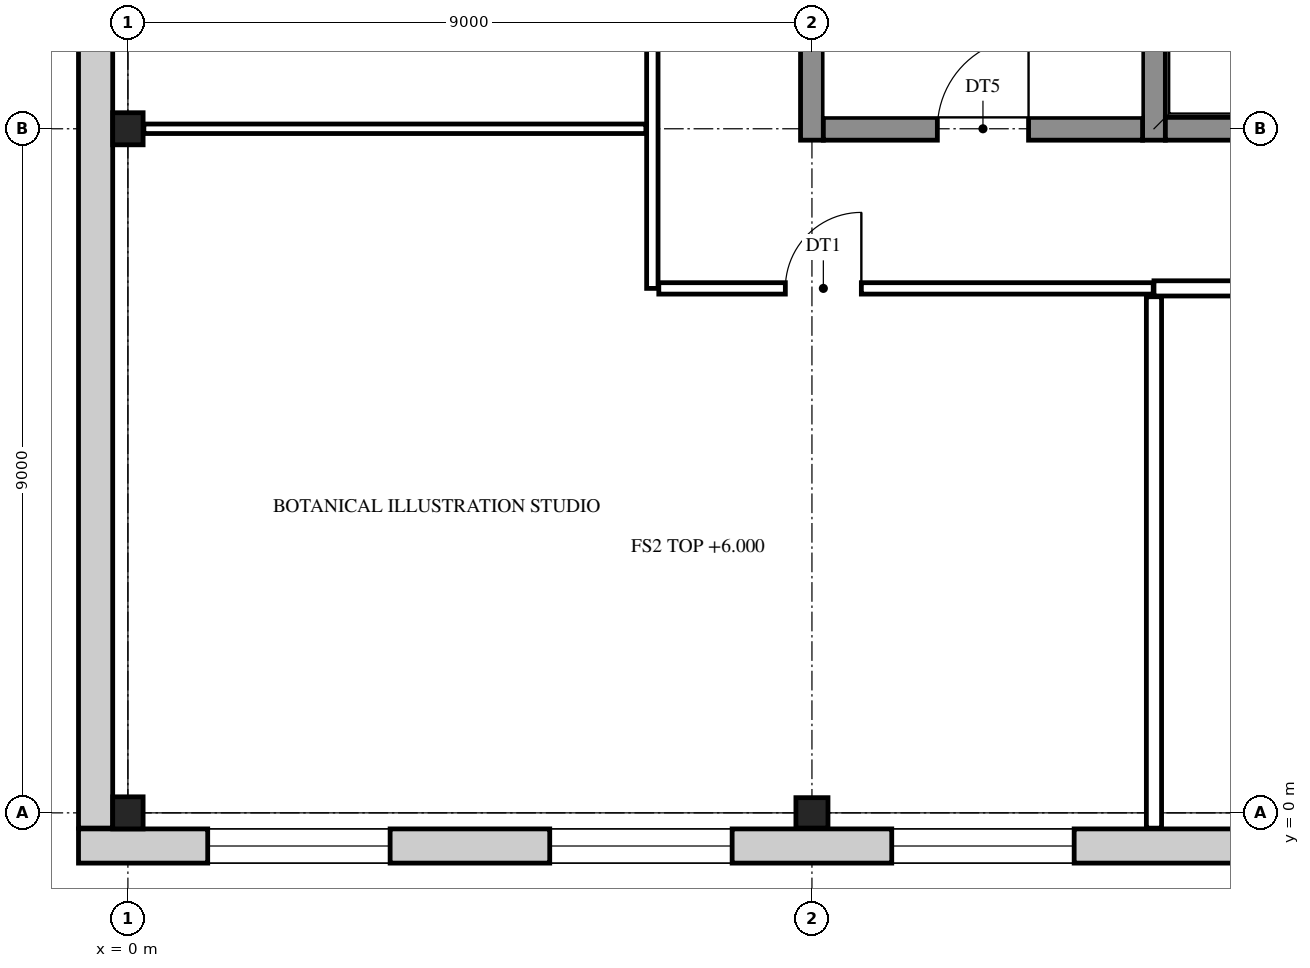
"""IFC4 building model, lengths in metres.
Left out: names, types, materials, properties, quantities, classifications, styles, units other than length and angle.
Written with IfcOpenShell. Run it as: python <this file> out.ifc"""

import sys

from ifc_helpers import new_model, si_unit, direction, frame, frame_2d, origin, origin_2d, place, context, subcontext, project, spatial, rectangle, i_section, extrude, element, fill, save


model = new_model("IFC4")
c1 = context("Model", 3, precision=1e-05, world=origin(), true_north=direction((0.0, 1.0)))
c2 = subcontext(c1, "Body", "Model", "MODEL_VIEW")
j1 = project(units=[si_unit("LENGTHUNIT", "METRE"), si_unit("PLANEANGLEUNIT", "RADIAN")], contexts=[c1])
p1 = place(None, origin())
s1 = spatial("IfcSite", under=j1, at=p1, CompositionType="ELEMENT")
p2 = place(p1, origin())
s2 = spatial("IfcBuilding", under=s1, at=p2, CompositionType="ELEMENT")
p3 = place(p2, frame((0.0, 0.0, 6.0)))
s3 = spatial("IfcBuildingStorey", under=s2, at=p3, CompositionType="ELEMENT", Elevation=6.0)
for number, where, z_axis, x_axis in (
    (1, (0.0, 0.0, 0.0), (0.0, 0.0, 1.0), (1.0, 0.0, 0.0)),
    (2, (0.0, 9.0, 0.0), (0.0, 0.0, 1.0), (1.0, 0.0, 0.0)),
    (3, (9.0, 0.0, 0.0), (0.0, 0.0, 1.0), (0.0, 1.0, 0.0)),
):
    element("IfcColumn", number, at=place(p3, frame(where, z_axis=z_axis, x_axis=x_axis)), inside=s3, PredefinedType="COLUMN", context=c2, shape_type="SweptSolid", body=[
        extrude(i_section(OverallWidth=0.4, OverallDepth=0.422, WebThickness=0.028, FlangeThickness=0.036, at=origin_2d()), origin(), (0.0, 0.0, 1.0), 4.5),
    ])
for number, where, z_axis, x_axis in (
    (4, (9.0, 8.85, 0.0), (0.0, 0.0, 1.0), (0.0, 1.0, 0.0)),
    (5, (13.5, 8.85, 0.0), (0.0, 0.0, 1.0), (0.0, 1.0, 0.0)),
):
    element("IfcWall", number, at=place(p3, frame(where, z_axis=z_axis, x_axis=x_axis)), inside=s3, PredefinedType="SHEAR", context=c2, shape_type="SweptSolid", body=[
        extrude(rectangle(XDim=9.3, YDim=0.3, at=frame_2d((4.65, 0.0))), origin(), (0.0, 0.0, 1.0), 4.5),
    ])
p4 = place(p3, frame((9.15, 9.0, 0.0), z_axis=(0.0, 0.0, 1.0), x_axis=(1.0, 0.0, 0.0)))
e6 = element("IfcWall", 6, at=p4, inside=s3, PredefinedType="SHEAR", context=c2, shape_type="SweptSolid", body=[
    extrude(rectangle(XDim=4.2, YDim=0.3, at=frame_2d((2.1, 0.0))), origin(), (0.0, 0.0, 1.0), 4.5),
])
p5 = place(p4, frame((1.5, 0.0, 0.0)))
e7 = element("IfcOpeningElement", 7, at=p5, cuts=e6, PredefinedType="OPENING", context=c2, shape_type="SweptSolid", body=[
    extrude(rectangle(XDim=1.2, YDim=2.1, at=frame_2d((0.6, 1.05))), frame((0.0, 0.16, 0.0), z_axis=(0.0, -1.0, 0.0), x_axis=(1.0, 0.0, 0.0)), (0.0, 0.0, 1.0), 0.32),
])
p6 = place(p3, frame((13.65, 9.0, 0.0), z_axis=(0.0, 0.0, 1.0), x_axis=(1.0, 0.0, 0.0)))
e8 = element("IfcWall", 8, at=p6, inside=s3, PredefinedType="SHEAR", context=c2, shape_type="SweptSolid", body=[
    extrude(rectangle(XDim=2.7, YDim=0.3, at=frame_2d((1.35, 0.0))), origin(), (0.0, 0.0, 1.0), 4.5),
])
p7 = place(p3, frame((32.15, -0.436, 0.0), z_axis=(0.0, 0.0, 1.0), x_axis=(-1.0, 0.0, 0.0)))
e9 = element("IfcWall", 9, at=p7, inside=s3, PredefinedType="STANDARD", context=c2, shape_type="SweptSolid", body=[
    extrude(rectangle(XDim=32.8, YDim=0.45, at=frame_2d((16.4, 0.0))), origin(), (0.0, 0.0, 1.0), 4.5),
])
p8 = place(p7, frame((28.7, 0.0, 0.9)))
e10 = element("IfcOpeningElement", 10, at=p8, cuts=e9, PredefinedType="OPENING", context=c2, shape_type="SweptSolid", body=[
    extrude(rectangle(XDim=2.4, YDim=2.8, at=frame_2d((1.2, 1.4))), frame((0.0, 0.235, 0.0), z_axis=(0.0, -1.0, 0.0), x_axis=(1.0, 0.0, 0.0)), (0.0, 0.0, 1.0), 0.47),
])
p9 = place(p7, frame((24.2, 0.0, 0.9)))
e11 = element("IfcOpeningElement", 11, at=p9, cuts=e9, PredefinedType="OPENING", context=c2, shape_type="SweptSolid", body=[
    extrude(rectangle(XDim=2.4, YDim=2.8, at=frame_2d((1.2, 1.4))), frame((0.0, 0.235, 0.0), z_axis=(0.0, -1.0, 0.0), x_axis=(1.0, 0.0, 0.0)), (0.0, 0.0, 1.0), 0.47),
])
p10 = place(p7, frame((19.7, 0.0, 0.9)))
e12 = element("IfcOpeningElement", 12, at=p10, cuts=e9, PredefinedType="OPENING", context=c2, shape_type="SweptSolid", body=[
    extrude(rectangle(XDim=2.4, YDim=2.8, at=frame_2d((1.2, 1.4))), frame((0.0, 0.235, 0.0), z_axis=(0.0, -1.0, 0.0), x_axis=(1.0, 0.0, 0.0)), (0.0, 0.0, 1.0), 0.47),
])
p11 = place(p7, frame((15.2, 0.0, 0.9)))
e13 = element("IfcOpeningElement", 13, at=p11, cuts=e9, PredefinedType="OPENING", context=c2, shape_type="SweptSolid", body=[
    extrude(rectangle(XDim=2.4, YDim=2.8, at=frame_2d((1.2, 1.4))), frame((0.0, 0.235, 0.0), z_axis=(0.0, -1.0, 0.0), x_axis=(1.0, 0.0, 0.0)), (0.0, 0.0, 1.0), 0.47),
])
p12 = place(p7, frame((10.7, 0.0, 0.9)))
e14 = element("IfcOpeningElement", 14, at=p12, cuts=e9, PredefinedType="OPENING", context=c2, shape_type="SweptSolid", body=[
    extrude(rectangle(XDim=2.4, YDim=2.8, at=frame_2d((1.2, 1.4))), frame((0.0, 0.235, 0.0), z_axis=(0.0, -1.0, 0.0), x_axis=(1.0, 0.0, 0.0)), (0.0, 0.0, 1.0), 0.47),
])
p13 = place(p7, frame((6.2, 0.0, 0.9)))
e15 = element("IfcOpeningElement", 15, at=p13, cuts=e9, PredefinedType="OPENING", context=c2, shape_type="SweptSolid", body=[
    extrude(rectangle(XDim=2.4, YDim=2.8, at=frame_2d((1.2, 1.4))), frame((0.0, 0.235, 0.0), z_axis=(0.0, -1.0, 0.0), x_axis=(1.0, 0.0, 0.0)), (0.0, 0.0, 1.0), 0.47),
])
p14 = place(p7, frame((1.7, 0.0, 0.9)))
e16 = element("IfcOpeningElement", 16, at=p14, cuts=e9, PredefinedType="OPENING", context=c2, shape_type="SweptSolid", body=[
    extrude(rectangle(XDim=2.4, YDim=2.8, at=frame_2d((1.2, 1.4))), frame((0.0, 0.235, 0.0), z_axis=(0.0, -1.0, 0.0), x_axis=(1.0, 0.0, 0.0)), (0.0, 0.0, 1.0), 0.47),
])
p15 = place(p3, frame((-0.425, -0.2, 0.0), z_axis=(0.0, 0.0, 1.0), x_axis=(0.0, 1.0, 0.0)))
e17 = element("IfcWall", 17, at=p15, inside=s3, PredefinedType="STANDARD", context=c2, shape_type="SweptSolid", body=[
    extrude(rectangle(XDim=27.4, YDim=0.45, at=frame_2d((13.7, 0.0))), origin(), (0.0, 0.0, 1.0), 4.5),
])
p16 = place(p15, frame((10.25, 0.0, 0.9)))
e18 = element("IfcOpeningElement", 18, at=p16, cuts=e17, PredefinedType="OPENING", context=c2, shape_type="SweptSolid", body=[
    extrude(rectangle(XDim=2.4, YDim=2.8, at=frame_2d((1.2, 1.4))), frame((0.0, 0.235, 0.0), z_axis=(0.0, -1.0, 0.0), x_axis=(1.0, 0.0, 0.0)), (0.0, 0.0, 1.0), 0.47),
])
p17 = place(p15, frame((14.75, 0.0, 0.9)))
e19 = element("IfcOpeningElement", 19, at=p17, cuts=e17, PredefinedType="OPENING", context=c2, shape_type="SweptSolid", body=[
    extrude(rectangle(XDim=2.4, YDim=2.8, at=frame_2d((1.2, 1.4))), frame((0.0, 0.235, 0.0), z_axis=(0.0, -1.0, 0.0), x_axis=(1.0, 0.0, 0.0)), (0.0, 0.0, 1.0), 0.47),
])
p18 = place(p3, frame((6.9, 6.9, 0.0), z_axis=(0.0, 0.0, 1.0), x_axis=(0.0, 1.0, 0.0)))
e20 = element("IfcWall", 20, at=p18, inside=s3, PredefinedType="PARTITIONING", context=c2, shape_type="SweptSolid", body=[
    extrude(rectangle(XDim=13.115, YDim=0.15, at=frame_2d((6.558, 0.0))), origin(), (0.0, 0.0, 1.0), 3.718),
])
p19 = place(p18, frame((3.85, 0.0, 0.0)))
e21 = element("IfcOpeningElement", 21, at=p19, cuts=e20, PredefinedType="OPENING", context=c2, shape_type="SweptSolid", body=[
    extrude(rectangle(XDim=1.0, YDim=2.1, at=frame_2d((0.5, 1.05))), frame((0.0, 0.085, 0.0), z_axis=(0.0, -1.0, 0.0), x_axis=(1.0, 0.0, 0.0)), (0.0, 0.0, 1.0), 0.17),
])
p20 = place(p18, frame((8.35, 0.0, 0.0)))
e22 = element("IfcOpeningElement", 22, at=p20, cuts=e20, PredefinedType="OPENING", context=c2, shape_type="SweptSolid", body=[
    extrude(rectangle(XDim=1.0, YDim=2.1, at=frame_2d((0.5, 1.05))), frame((0.0, 0.085, 0.0), z_axis=(0.0, -1.0, 0.0), x_axis=(1.0, 0.0, 0.0)), (0.0, 0.0, 1.0), 0.17),
])
p21 = place(p3, frame((13.5, -0.201, 0.0), z_axis=(0.0, 0.0, 1.0), x_axis=(0.0, 1.0, 0.0)))
e23 = element("IfcWall", 23, at=p21, inside=s3, PredefinedType="PARTITIONING", context=c2, shape_type="SweptSolid", body=[
    extrude(rectangle(XDim=6.991, YDim=0.2, at=frame_2d((3.496, 0.0))), origin(), (0.0, 0.0, 1.0), 3.718),
])
p22 = place(p3, frame((6.985, 6.9, 0.0), z_axis=(0.0, 0.0, 1.0), x_axis=(1.0, 0.0, 0.0)))
e24 = element("IfcWall", 24, at=p22, inside=s3, PredefinedType="PARTITIONING", context=c2, shape_type="SweptSolid", body=[
    extrude(rectangle(XDim=6.505, YDim=0.15, at=frame_2d((3.252, 0.0))), origin(), (0.0, 0.0, 1.0), 3.718),
])
p23 = place(p22, frame((1.665, 0.0, 0.0)))
e25 = element("IfcOpeningElement", 25, at=p23, cuts=e24, PredefinedType="OPENING", context=c2, shape_type="SweptSolid", body=[
    extrude(rectangle(XDim=1.0, YDim=2.1, at=frame_2d((0.5, 1.05))), frame((0.0, 0.085, 0.0), z_axis=(0.0, -1.0, 0.0), x_axis=(1.0, 0.0, 0.0)), (0.0, 0.0, 1.0), 0.17),
])
p24 = place(p3, frame((13.5, 6.9, 0.0), z_axis=(0.0, 0.0, 1.0), x_axis=(1.0, 0.0, 0.0)))
e26 = element("IfcWall", 26, at=p24, inside=s3, PredefinedType="PARTITIONING", context=c2, shape_type="SweptSolid", body=[
    extrude(rectangle(XDim=13.5, YDim=0.2, at=frame_2d((6.75, 0.0))), origin(), (0.0, 0.0, 1.0), 3.718),
])
p25 = place(p24, frame((7.45, 0.0, 0.0)))
e27 = element("IfcOpeningElement", 27, at=p25, cuts=e26, PredefinedType="OPENING", context=c2, shape_type="SweptSolid", body=[
    extrude(rectangle(XDim=1.0, YDim=2.1, at=frame_2d((0.5, 1.05))), frame((0.0, 0.11, 0.0), z_axis=(0.0, -1.0, 0.0), x_axis=(1.0, 0.0, 0.0)), (0.0, 0.0, 1.0), 0.22),
])
p26 = place(p3, frame((0.21, 9.0, 0.0), z_axis=(0.0, 0.0, 1.0), x_axis=(1.0, 0.0, 0.0)))
e28 = element("IfcWall", 28, at=p26, inside=s3, PredefinedType="PARTITIONING", context=c2, shape_type="SweptSolid", body=[
    extrude(rectangle(XDim=6.605, YDim=0.125, at=frame_2d((3.302, 0.0))), origin(), (0.0, 0.0, 1.0), 3.718),
])
p27 = place(p8, origin())
e29 = element("IfcWindow", 29, at=p27, inside=s3, PartitioningType="SINGLE_PANEL", PredefinedType="WINDOW", context=c2, shape_type="SweptSolid", body=[
    extrude(rectangle(XDim=2.4, YDim=2.8, at=frame_2d((1.2, 1.4))), frame((0.0, 0.03, 0.0), z_axis=(0.0, -1.0, 0.0), x_axis=(1.0, 0.0, 0.0)), (0.0, 0.0, 1.0), 0.06),
])
fill(e10, e29)
p28 = place(p9, origin())
e30 = element("IfcWindow", 30, at=p28, inside=s3, PartitioningType="SINGLE_PANEL", PredefinedType="WINDOW", context=c2, shape_type="SweptSolid", body=[
    extrude(rectangle(XDim=2.4, YDim=2.8, at=frame_2d((1.2, 1.4))), frame((0.0, 0.03, 0.0), z_axis=(0.0, -1.0, 0.0), x_axis=(1.0, 0.0, 0.0)), (0.0, 0.0, 1.0), 0.06),
])
fill(e11, e30)
p29 = place(p10, origin())
e31 = element("IfcWindow", 31, at=p29, inside=s3, PartitioningType="SINGLE_PANEL", PredefinedType="WINDOW", context=c2, shape_type="SweptSolid", body=[
    extrude(rectangle(XDim=2.4, YDim=2.8, at=frame_2d((1.2, 1.4))), frame((0.0, 0.03, 0.0), z_axis=(0.0, -1.0, 0.0), x_axis=(1.0, 0.0, 0.0)), (0.0, 0.0, 1.0), 0.06),
])
fill(e12, e31)
p30 = place(p5, origin())
e32 = element("IfcDoor", 32, at=p30, inside=s3, OperationType="SINGLE_SWING_RIGHT", PredefinedType="DOOR", context=c2, shape_type="SweptSolid", body=[
    extrude(rectangle(XDim=1.2, YDim=2.1, at=frame_2d((0.6, 1.05))), frame((0.0, 0.025, 0.0), z_axis=(0.0, -1.0, 0.0), x_axis=(1.0, 0.0, 0.0)), (0.0, 0.0, 1.0), 0.05),
])
fill(e7, e32)
p31 = place(p23, frame((1.0, 0.0, 0.0), z_axis=(0.0, 0.0, 1.0), x_axis=(-1.0, 0.0, 0.0)))
e33 = element("IfcDoor", 33, at=p31, inside=s3, OperationType="SINGLE_SWING_RIGHT", PredefinedType="DOOR", context=c2, shape_type="SweptSolid", body=[
    extrude(rectangle(XDim=1.0, YDim=2.1, at=frame_2d((0.5, 1.05))), frame((0.0, 0.025, 0.0), z_axis=(0.0, -1.0, 0.0), x_axis=(1.0, 0.0, 0.0)), (0.0, 0.0, 1.0), 0.05),
])
fill(e25, e33)
save(model, sys.argv[1])
